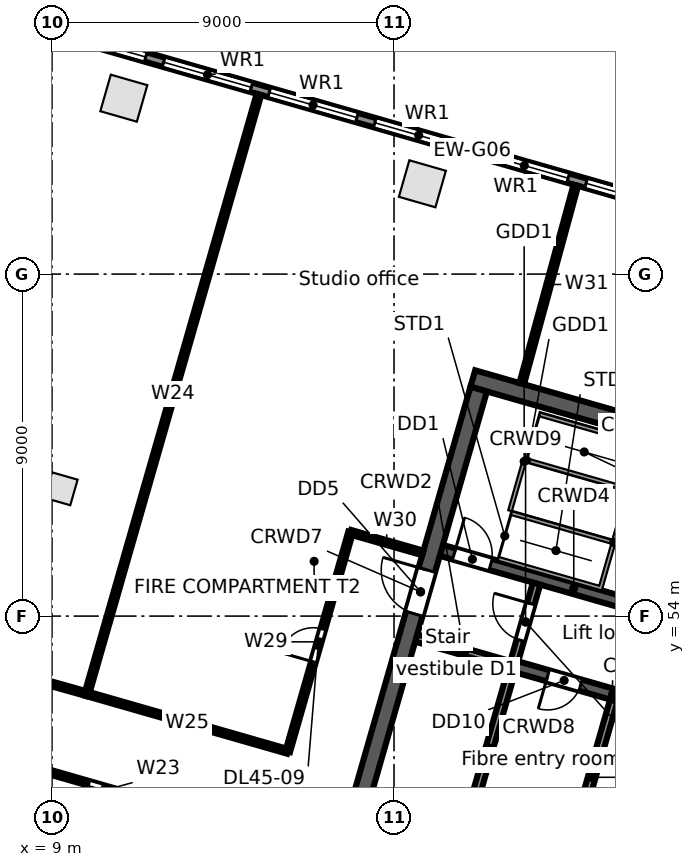
"""IFC4 building model, lengths in metres.
Left out: names, types, materials, properties, quantities, classifications, styles, units other than length and angle.
Written with IfcOpenShell. Run it as: python <this file> out.ifc"""

import sys

from ifc_helpers import new_model, si_unit, direction, frame, frame_2d, origin, origin_2d, place, context, subcontext, project, spatial, rectangle, extrude, element, fill, save


model = new_model("IFC4")
c1 = context("Model", 3, precision=1e-05, world=origin(), true_north=direction((0.0, 1.0)))
c2 = subcontext(c1, "Body", "Model", "MODEL_VIEW")
j1 = project(units=[si_unit("LENGTHUNIT", "METRE"), si_unit("PLANEANGLEUNIT", "RADIAN")], contexts=[c1])
p1 = place(None, origin())
s1 = spatial("IfcSite", under=j1, at=p1, CompositionType="ELEMENT")
p2 = place(p1, origin())
s2 = spatial("IfcBuilding", under=s1, at=p2, CompositionType="ELEMENT")
p3 = place(p2, frame((0.0, 0.0, 207.5)))
s3 = spatial("IfcBuildingStorey", under=s2, at=p3, CompositionType="ELEMENT", Elevation=207.5)
for number, where, z_axis, x_axis in (
    (1, (18.746, 65.376, 0.0), (0.0, 0.0, 1.0), (-0.961, 0.276, 0.0)),
    (2, (10.89, 67.629, 0.0), (0.0, 0.0, 1.0), (-0.961, 0.276, 0.0)),
):
    element("IfcColumn", number, at=place(p3, frame(where, z_axis=z_axis, x_axis=x_axis)), inside=s3, PredefinedType="COLUMN", context=c2, shape_type="SweptSolid", body=[
        extrude(rectangle(XDim=1.0, YDim=1.0, at=origin_2d()), origin(), (0.0, 0.0, 1.0), 3.9),
    ])
p4 = place(p3, frame((9.241, 57.35, 0.0), z_axis=(0.0, 0.0, 1.0), x_axis=(0.961261695938, -0.275637355817, 0.0)))
e3 = element("IfcColumn", 3, at=p4, inside=s3, PredefinedType="COLUMN", context=c2, shape_type="SweptSolid", body=[
    extrude(rectangle(XDim=0.7, YDim=0.7, at=origin_2d()), origin(), (0.0, 0.0, 1.0), 3.9),
])
p5 = place(p3, frame((3.34, 71.042, 0.0), z_axis=(0.0, 0.0, 1.0), x_axis=(0.96126179431, -0.275637012753, 0.0)))
e4 = element("IfcWall", 4, at=p5, inside=s3, PredefinedType="STANDARD", context=c2, shape_type="SweptSolid", body=[
    extrude(rectangle(XDim=34.779, YDim=0.25, at=frame_2d((17.39, 0.0))), origin(), (0.0, 0.0, 1.0), 3.62),
])
p6 = place(p5, frame((32.071, 0.0, 0.8)))
e5 = element("IfcOpeningElement", 5, at=p6, cuts=e4, PredefinedType="OPENING", context=c2, shape_type="SweptSolid", body=[
    extrude(rectangle(XDim=2.4, YDim=2.2, at=frame_2d((1.2, 1.1))), frame((0.0, 0.135, 0.0), z_axis=(0.0, -1.0, 0.0), x_axis=(1.0, 0.0, 0.0)), (0.0, 0.0, 1.0), 0.27),
])
p7 = place(p5, frame((29.18, 0.0, 0.8)))
e6 = element("IfcOpeningElement", 6, at=p7, cuts=e4, PredefinedType="OPENING", context=c2, shape_type="SweptSolid", body=[
    extrude(rectangle(XDim=2.4, YDim=2.2, at=frame_2d((1.2, 1.1))), frame((0.0, 0.135, 0.0), z_axis=(0.0, -1.0, 0.0), x_axis=(1.0, 0.0, 0.0)), (0.0, 0.0, 1.0), 0.27),
])
p8 = place(p5, frame((26.289, 0.0, 0.8)))
e7 = element("IfcOpeningElement", 7, at=p8, cuts=e4, PredefinedType="OPENING", context=c2, shape_type="SweptSolid", body=[
    extrude(rectangle(XDim=2.4, YDim=2.2, at=frame_2d((1.2, 1.1))), frame((0.0, 0.135, 0.0), z_axis=(0.0, -1.0, 0.0), x_axis=(1.0, 0.0, 0.0)), (0.0, 0.0, 1.0), 0.27),
])
p9 = place(p5, frame((23.398, 0.0, 0.8)))
e8 = element("IfcOpeningElement", 8, at=p9, cuts=e4, PredefinedType="OPENING", context=c2, shape_type="SweptSolid", body=[
    extrude(rectangle(XDim=2.4, YDim=2.2, at=frame_2d((1.2, 1.1))), frame((0.0, 0.135, 0.0), z_axis=(0.0, -1.0, 0.0), x_axis=(1.0, 0.0, 0.0)), (0.0, 0.0, 1.0), 0.27),
])
p10 = place(p5, frame((20.508, 0.0, 0.8)))
e9 = element("IfcOpeningElement", 9, at=p10, cuts=e4, PredefinedType="OPENING", context=c2, shape_type="SweptSolid", body=[
    extrude(rectangle(XDim=2.4, YDim=2.2, at=frame_2d((1.2, 1.1))), frame((0.0, 0.135, 0.0), z_axis=(0.0, -1.0, 0.0), x_axis=(1.0, 0.0, 0.0)), (0.0, 0.0, 1.0), 0.27),
])
p11 = place(p5, frame((17.616, 0.0, 0.8)))
e10 = element("IfcOpeningElement", 10, at=p11, cuts=e4, PredefinedType="OPENING", context=c2, shape_type="SweptSolid", body=[
    extrude(rectangle(XDim=2.4, YDim=2.2, at=frame_2d((1.2, 1.1))), frame((0.0, 0.135, 0.0), z_axis=(0.0, -1.0, 0.0), x_axis=(1.0, 0.0, 0.0)), (0.0, 0.0, 1.0), 0.27),
])
p12 = place(p5, frame((14.726, 0.0, 0.8)))
e11 = element("IfcOpeningElement", 11, at=p12, cuts=e4, PredefinedType="OPENING", context=c2, shape_type="SweptSolid", body=[
    extrude(rectangle(XDim=2.4, YDim=2.2, at=frame_2d((1.2, 1.1))), frame((0.0, 0.135, 0.0), z_axis=(0.0, -1.0, 0.0), x_axis=(1.0, 0.0, 0.0)), (0.0, 0.0, 1.0), 0.27),
])
p13 = place(p5, frame((11.834, 0.0, 0.8)))
e12 = element("IfcOpeningElement", 12, at=p13, cuts=e4, PredefinedType="OPENING", context=c2, shape_type="SweptSolid", body=[
    extrude(rectangle(XDim=2.4, YDim=2.2, at=frame_2d((1.2, 1.1))), frame((0.0, 0.135, 0.0), z_axis=(0.0, -1.0, 0.0), x_axis=(1.0, 0.0, 0.0)), (0.0, 0.0, 1.0), 0.27),
])
p14 = place(p5, frame((8.944, 0.0, 0.8)))
e13 = element("IfcOpeningElement", 13, at=p14, cuts=e4, PredefinedType="OPENING", context=c2, shape_type="SweptSolid", body=[
    extrude(rectangle(XDim=2.4, YDim=2.2, at=frame_2d((1.2, 1.1))), frame((0.0, 0.135, 0.0), z_axis=(0.0, -1.0, 0.0), x_axis=(1.0, 0.0, 0.0)), (0.0, 0.0, 1.0), 0.27),
])
p15 = place(p5, frame((6.052, 0.0, 0.8)))
e14 = element("IfcOpeningElement", 14, at=p15, cuts=e4, PredefinedType="OPENING", context=c2, shape_type="SweptSolid", body=[
    extrude(rectangle(XDim=2.4, YDim=2.2, at=frame_2d((1.2, 1.1))), frame((0.0, 0.135, 0.0), z_axis=(0.0, -1.0, 0.0), x_axis=(1.0, 0.0, 0.0)), (0.0, 0.0, 1.0), 0.27),
])
p16 = place(p5, frame((3.162, 0.0, 0.8)))
e15 = element("IfcOpeningElement", 15, at=p16, cuts=e4, PredefinedType="OPENING", context=c2, shape_type="SweptSolid", body=[
    extrude(rectangle(XDim=2.4, YDim=2.2, at=frame_2d((1.2, 1.1))), frame((0.0, 0.135, 0.0), z_axis=(0.0, -1.0, 0.0), x_axis=(1.0, 0.0, 0.0)), (0.0, 0.0, 1.0), 0.27),
])
p17 = place(p5, frame((0.271, 0.0, 0.8)))
e16 = element("IfcOpeningElement", 16, at=p17, cuts=e4, PredefinedType="OPENING", context=c2, shape_type="SweptSolid", body=[
    extrude(rectangle(XDim=2.4, YDim=2.2, at=frame_2d((1.2, 1.1))), frame((0.0, 0.135, 0.0), z_axis=(0.0, -1.0, 0.0), x_axis=(1.0, 0.0, 0.0)), (0.0, 0.0, 1.0), 0.27),
])
p18 = place(p3, frame((18.583, 53.423, 0.0), z_axis=(0.0, 0.0, 1.0), x_axis=(0.961259287968, -0.275645753268, 0.0)))
e17 = element("IfcWall", 17, at=p18, inside=s3, PredefinedType="SOLIDWALL", context=c2, shape_type="SweptSolid", body=[
    extrude(rectangle(XDim=2.65, YDim=0.2, at=frame_2d((1.325, 0.0))), origin(), (0.0, 0.0, 1.0), 3.62),
])
p19 = place(p3, frame((21.131, 52.692, 0.0), z_axis=(0.0, 0.0, 1.0), x_axis=(0.961261488075, -0.275638080722, 0.0)))
e18 = element("IfcWall", 18, at=p19, inside=s3, PredefinedType="SOLIDWALL", context=c2, shape_type="SweptSolid", body=[
    extrude(rectangle(XDim=5.45, YDim=0.3, at=frame_2d((2.725, 0.0))), origin(), (0.0, 0.0, 1.0), 3.62),
])
p20 = place(p19, frame((0.95, 0.0, 0.0)))
e19 = element("IfcOpeningElement", 19, at=p20, cuts=e18, PredefinedType="OPENING", context=c2, shape_type="SweptSolid", body=[
    extrude(rectangle(XDim=0.9, YDim=2.1, at=frame_2d((0.45, 1.05))), frame((0.0, 0.16, 0.0), z_axis=(0.0, -1.0, 0.0), x_axis=(1.0, 0.0, 0.0)), (0.0, 0.0, 1.0), 0.32),
])
p21 = place(p19, frame((3.75, 0.0, 0.0)))
e20 = element("IfcOpeningElement", 20, at=p21, cuts=e18, PredefinedType="OPENING", context=c2, shape_type="SweptSolid", body=[
    extrude(rectangle(XDim=0.9, YDim=2.1, at=frame_2d((0.45, 1.05))), frame((0.0, 0.16, 0.0), z_axis=(0.0, -1.0, 0.0), x_axis=(1.0, 0.0, 0.0)), (0.0, 0.0, 1.0), 0.32),
])
p22 = place(p3, frame((19.245, 55.73, 0.0), z_axis=(0.0, 0.0, 1.0), x_axis=(0.961263007877, -0.275632780503, 0.0)))
e21 = element("IfcWall", 21, at=p22, inside=s3, PredefinedType="SOLIDWALL", context=c2, shape_type="SweptSolid", body=[
    extrude(rectangle(XDim=7.25, YDim=0.3, at=frame_2d((3.625, 0.0))), origin(), (0.0, 0.0, 1.0), 3.62),
])
p23 = place(p22, frame((0.35, 0.0, 0.0)))
e22 = element("IfcOpeningElement", 22, at=p23, cuts=e21, PredefinedType="OPENING", context=c2, shape_type="SweptSolid", body=[
    extrude(rectangle(XDim=1.0, YDim=2.1, at=frame_2d((0.5, 1.05))), frame((0.0, 0.16, 0.0), z_axis=(0.0, -1.0, 0.0), x_axis=(1.0, 0.0, 0.0)), (0.0, 0.0, 1.0), 0.32),
])
p24 = place(p3, frame((20.073, 60.252, 0.0), z_axis=(0.0, 0.0, 1.0), x_axis=(0.96126248289, -0.275634611374, 0.0)))
e23 = element("IfcWall", 23, at=p24, inside=s3, PredefinedType="SOLIDWALL", context=c2, shape_type="SweptSolid", body=[
    extrude(rectangle(XDim=9.0, YDim=0.45, at=frame_2d((4.5, 0.0))), origin(), (0.0, 0.0, 1.0), 3.62),
])
p25 = place(p3, frame((17.168, 49.303, 0.0), z_axis=(0.0, 0.0, 1.0), x_axis=(0.275638974822, 0.961261231695, 0.0)))
e24 = element("IfcWall", 24, at=p25, inside=s3, PredefinedType="SOLIDWALL", context=c2, shape_type="SweptSolid", body=[
    extrude(rectangle(XDim=11.1, YDim=0.45, at=frame_2d((5.55, 0.0))), origin(), (0.0, 0.0, 1.0), 3.62),
])
p26 = place(p25, frame((4.95, 0.0, 0.0)))
e25 = element("IfcOpeningElement", 25, at=p26, cuts=e24, PredefinedType="OPENING", context=c2, shape_type="SweptSolid", body=[
    extrude(rectangle(XDim=1.2, YDim=2.1, at=frame_2d((0.6, 1.05))), frame((0.0, 0.235, 0.0), z_axis=(0.0, -1.0, 0.0), x_axis=(1.0, 0.0, 0.0)), (0.0, 0.0, 1.0), 0.47),
])
p27 = place(p3, frame((19.932, 48.511, 0.0), z_axis=(0.0, 0.0, 1.0), x_axis=(0.275642273411, 0.961260285827, 0.0)))
e26 = element("IfcWall", 26, at=p27, inside=s3, PredefinedType="SOLIDWALL", context=c2, shape_type="SweptSolid", body=[
    extrude(rectangle(XDim=4.2, YDim=0.2, at=frame_2d((2.1, 0.0))), origin(), (0.0, 0.0, 1.0), 3.62),
])
p28 = place(p3, frame((21.172, 52.837, 0.0), z_axis=(0.0, 0.0, 1.0), x_axis=(0.275657676022, 0.961255868981, 0.0)))
e27 = element("IfcWall", 27, at=p28, inside=s3, PredefinedType="PARTITIONING", context=c2, shape_type="SweptSolid", body=[
    extrude(rectangle(XDim=2.1, YDim=0.2, at=frame_2d((1.05, 0.0))), origin(), (0.0, 0.0, 1.0), 3.62),
])
p29 = place(p28, frame((0.55, 0.0, 0.0)))
e28 = element("IfcOpeningElement", 28, at=p29, cuts=e27, PredefinedType="OPENING", context=c2, shape_type="SweptSolid", body=[
    extrude(rectangle(XDim=1.0, YDim=2.1, at=frame_2d((0.5, 1.05))), frame((0.0, 0.11, 0.0), z_axis=(0.0, -1.0, 0.0), x_axis=(1.0, 0.0, 0.0)), (0.0, 0.0, 1.0), 0.22),
])
p30 = place(p3, frame((22.623, 47.739, 0.0), z_axis=(0.0, 0.0, 1.0), x_axis=(0.275642273411, 0.961260285827, 0.0)))
e29 = element("IfcWall", 29, at=p30, inside=s3, PredefinedType="PARTITIONING", context=c2, shape_type="SweptSolid", body=[
    extrude(rectangle(XDim=4.2, YDim=0.2, at=frame_2d((2.1, 0.0))), origin(), (0.0, 0.0, 1.0), 3.62),
])
p31 = place(p3, frame((0.0, 54.75, 0.0), z_axis=(0.0, 0.0, 1.0), x_axis=(0.962504897093, -0.271264304823, 0.0)))
e30 = element("IfcWall", 30, at=p31, inside=s3, PredefinedType="PARTITIONING", context=c2, shape_type="SweptSolid", body=[
    extrude(rectangle(XDim=10.303, YDim=0.125, at=frame_2d((5.152, 0.0))), origin(), (0.0, 0.0, 1.0), 2.9),
])
p32 = place(p31, frame((4.7, 0.0, 0.0)))
e31 = element("IfcOpeningElement", 31, at=p32, cuts=e30, PredefinedType="OPENING", context=c2, shape_type="SweptSolid", body=[
    extrude(rectangle(XDim=0.9, YDim=2.1, at=frame_2d((0.45, 1.05))), frame((0.0, 0.073, 0.0), z_axis=(0.0, -1.0, 0.0), x_axis=(1.0, 0.0, 0.0)), (0.0, 0.0, 1.0), 0.145),
])
p33 = place(p3, frame((6.413, 50.619, 0.0), z_axis=(0.0, 0.0, 1.0), x_axis=(0.961251402136, -0.275673252041, 0.0)))
e32 = element("IfcWall", 32, at=p33, inside=s3, PredefinedType="PARTITIONING", context=c2, shape_type="SweptSolid", body=[
    extrude(rectangle(XDim=8.499, YDim=0.125, at=frame_2d((4.25, 0.0))), origin(), (0.0, 0.0, 1.0), 2.8),
])
p34 = place(p33, frame((3.7, 0.0, 0.0)))
e33 = element("IfcOpeningElement", 33, at=p34, cuts=e32, PredefinedType="OPENING", context=c2, shape_type="SweptSolid", body=[
    extrude(rectangle(XDim=0.9, YDim=2.1, at=frame_2d((0.45, 1.05))), frame((0.0, 0.073, 0.0), z_axis=(0.0, -1.0, 0.0), x_axis=(1.0, 0.0, 0.0)), (0.0, 0.0, 1.0), 0.145),
])
p35 = place(p3, frame((9.917, 51.955, 0.0), z_axis=(0.0, 0.0, 1.0), x_axis=(0.275933286704, 0.96117678982, 0.0)))
e34 = element("IfcWall", 34, at=p35, inside=s3, PredefinedType="PARTITIONING", context=c2, shape_type="SweptSolid", body=[
    extrude(rectangle(XDim=16.41, YDim=0.125, at=frame_2d((8.205, 0.0))), origin(), (0.0, 0.0, 1.0), 2.792),
])
p36 = place(p3, frame((9.917, 51.955, 0.0), z_axis=(0.0, 0.0, 1.0), x_axis=(0.961258850611, -0.275647278458, 0.0)))
e35 = element("IfcWall", 35, at=p36, inside=s3, PredefinedType="PARTITIONING", context=c2, shape_type="SweptSolid", body=[
    extrude(rectangle(XDim=5.5, YDim=0.125, at=frame_2d((2.75, 0.0))), origin(), (0.0, 0.0, 1.0), 2.8),
])
p37 = place(p3, frame((15.204, 50.439, 0.0), z_axis=(0.0, 0.0, 1.0), x_axis=(0.275505760599, 0.961299420512, 0.0)))
e36 = element("IfcWall", 36, at=p37, inside=s3, PredefinedType="PARTITIONING", context=c2, shape_type="SweptSolid", body=[
    extrude(rectangle(XDim=5.999, YDim=0.125, at=frame_2d((3.0, 0.0))), origin(), (0.0, 0.0, 1.0), 2.8),
])
p38 = place(p37, frame((2.45, 0.0, 0.0)))
e37 = element("IfcOpeningElement", 37, at=p38, cuts=e36, PredefinedType="OPENING", context=c2, shape_type="SweptSolid", body=[
    extrude(rectangle(XDim=0.9, YDim=2.1, at=frame_2d((0.45, 1.05))), frame((0.0, 0.073, 0.0), z_axis=(0.0, -1.0, 0.0), x_axis=(1.0, 0.0, 0.0)), (0.0, 0.0, 1.0), 0.145),
])
p39 = place(p3, frame((16.857, 56.206, 0.0), z_axis=(0.0, 0.0, 1.0), x_axis=(0.961383985066, -0.275210525341, 0.0)))
e38 = element("IfcWall", 38, at=p39, inside=s3, PredefinedType="PARTITIONING", context=c2, shape_type="SweptSolid", body=[
    extrude(rectangle(XDim=1.977, YDim=0.125, at=frame_2d((0.988, 0.0))), origin(), (0.0, 0.0, 1.0), 3.62),
])
p40 = place(p3, frame((21.36, 60.117, 0.0), z_axis=(0.0, 0.0, 1.0), x_axis=(0.263151767798, 0.964754449124, 0.0)))
e39 = element("IfcWall", 39, at=p40, inside=s3, PredefinedType="PARTITIONING", context=c2, shape_type="SweptSolid", body=[
    extrude(rectangle(XDim=5.411, YDim=0.125, at=frame_2d((2.705, 0.0))), origin(), (0.0, 0.0, 1.0), 3.0),
])
p41 = place(p10, origin())
e40 = element("IfcWindow", 40, at=p41, inside=s3, PartitioningType="SINGLE_PANEL", PredefinedType="WINDOW", context=c2, shape_type="SweptSolid", body=[
    extrude(rectangle(XDim=2.4, YDim=2.2, at=frame_2d((1.2, 1.1))), frame((0.0, 0.03, 0.0), z_axis=(0.0, -1.0, 0.0), x_axis=(1.0, 0.0, 0.0)), (0.0, 0.0, 1.0), 0.06),
])
fill(e9, e40)
p42 = place(p11, origin())
e41 = element("IfcWindow", 41, at=p42, inside=s3, PartitioningType="SINGLE_PANEL", PredefinedType="WINDOW", context=c2, shape_type="SweptSolid", body=[
    extrude(rectangle(XDim=2.4, YDim=2.2, at=frame_2d((1.2, 1.1))), frame((0.0, 0.03, 0.0), z_axis=(0.0, -1.0, 0.0), x_axis=(1.0, 0.0, 0.0)), (0.0, 0.0, 1.0), 0.06),
])
fill(e10, e41)
p43 = place(p12, origin())
e42 = element("IfcWindow", 42, at=p43, inside=s3, PartitioningType="SINGLE_PANEL", PredefinedType="WINDOW", context=c2, shape_type="SweptSolid", body=[
    extrude(rectangle(XDim=2.4, YDim=2.2, at=frame_2d((1.2, 1.1))), frame((0.0, 0.03, 0.0), z_axis=(0.0, -1.0, 0.0), x_axis=(1.0, 0.0, 0.0)), (0.0, 0.0, 1.0), 0.06),
])
fill(e11, e42)
p44 = place(p13, origin())
e43 = element("IfcWindow", 43, at=p44, inside=s3, PartitioningType="SINGLE_PANEL", PredefinedType="WINDOW", context=c2, shape_type="SweptSolid", body=[
    extrude(rectangle(XDim=2.4, YDim=2.2, at=frame_2d((1.2, 1.1))), frame((0.0, 0.03, 0.0), z_axis=(0.0, -1.0, 0.0), x_axis=(1.0, 0.0, 0.0)), (0.0, 0.0, 1.0), 0.06),
])
fill(e12, e43)
p45 = place(p14, origin())
e44 = element("IfcWindow", 44, at=p45, inside=s3, PartitioningType="SINGLE_PANEL", PredefinedType="WINDOW", context=c2, shape_type="SweptSolid", body=[
    extrude(rectangle(XDim=2.4, YDim=2.2, at=frame_2d((1.2, 1.1))), frame((0.0, 0.03, 0.0), z_axis=(0.0, -1.0, 0.0), x_axis=(1.0, 0.0, 0.0)), (0.0, 0.0, 1.0), 0.06),
])
fill(e13, e44)
p46 = place(p15, origin())
e45 = element("IfcWindow", 45, at=p46, inside=s3, PartitioningType="SINGLE_PANEL", PredefinedType="WINDOW", context=c2, shape_type="SweptSolid", body=[
    extrude(rectangle(XDim=2.4, YDim=2.2, at=frame_2d((1.2, 1.1))), frame((0.0, 0.03, 0.0), z_axis=(0.0, -1.0, 0.0), x_axis=(1.0, 0.0, 0.0)), (0.0, 0.0, 1.0), 0.06),
])
fill(e14, e45)
p47 = place(p23, origin())
e46 = element("IfcDoor", 46, at=p47, inside=s3, OperationType="SINGLE_SWING_LEFT", PredefinedType="DOOR", context=c2, shape_type="SweptSolid", body=[
    extrude(rectangle(XDim=1.0, YDim=2.1, at=frame_2d((0.5, 1.05))), frame((0.0, 0.025, 0.0), z_axis=(0.0, -1.0, 0.0), x_axis=(1.0, 0.0, 0.0)), (0.0, 0.0, 1.0), 0.05),
])
fill(e22, e46)
p48 = place(p29, origin())
e47 = element("IfcDoor", 47, at=p48, inside=s3, OperationType="SINGLE_SWING_RIGHT", PredefinedType="DOOR", context=c2, shape_type="SweptSolid", body=[
    extrude(rectangle(XDim=1.0, YDim=2.1, at=frame_2d((0.5, 1.05))), frame((0.0, 0.025, 0.0), z_axis=(0.0, -1.0, 0.0), x_axis=(1.0, 0.0, 0.0)), (0.0, 0.0, 1.0), 0.05),
])
fill(e28, e47)
p49 = place(p26, origin())
e48 = element("IfcDoor", 48, at=p49, inside=s3, OperationType="SINGLE_SWING_RIGHT", PredefinedType="DOOR", context=c2, shape_type="SweptSolid", body=[
    extrude(rectangle(XDim=1.2, YDim=2.1, at=frame_2d((0.6, 1.05))), frame((0.0, 0.025, 0.0), z_axis=(0.0, -1.0, 0.0), x_axis=(1.0, 0.0, 0.0)), (0.0, 0.0, 1.0), 0.05),
])
fill(e25, e48)
p50 = place(p20, frame((0.9, 0.0, 0.0), z_axis=(0.0, 0.0, 1.0), x_axis=(-1.0, 0.0, 0.0)))
e49 = element("IfcDoor", 49, at=p50, inside=s3, OperationType="SINGLE_SWING_RIGHT", PredefinedType="DOOR", context=c2, shape_type="SweptSolid", body=[
    extrude(rectangle(XDim=0.9, YDim=2.1, at=frame_2d((0.45, 1.05))), frame((0.0, 0.025, 0.0), z_axis=(0.0, -1.0, 0.0), x_axis=(1.0, 0.0, 0.0)), (0.0, 0.0, 1.0), 0.05),
])
fill(e19, e49)
p51 = place(p38, origin())
e50 = element("IfcDoor", 50, at=p51, inside=s3, OperationType="SINGLE_SWING_LEFT", PredefinedType="DOOR", context=c2, shape_type="SweptSolid", body=[
    extrude(rectangle(XDim=0.9, YDim=2.1, at=frame_2d((0.45, 1.05))), frame((0.0, 0.025, 0.0), z_axis=(0.0, -1.0, 0.0), x_axis=(1.0, 0.0, 0.0)), (0.0, 0.0, 1.0), 0.05),
])
fill(e37, e50)
p52 = place(p34, frame((0.9, 0.0, 0.0), z_axis=(0.0, 0.0, 1.0), x_axis=(-1.0, 0.0, 0.0)))
e51 = element("IfcDoor", 51, at=p52, inside=s3, OperationType="SINGLE_SWING_RIGHT", PredefinedType="DOOR", context=c2, shape_type="SweptSolid", body=[
    extrude(rectangle(XDim=0.9, YDim=2.1, at=frame_2d((0.45, 1.05))), frame((0.0, 0.025, 0.0), z_axis=(0.0, -1.0, 0.0), x_axis=(1.0, 0.0, 0.0)), (0.0, 0.0, 1.0), 0.05),
])
fill(e33, e51)
save(model, sys.argv[1])
